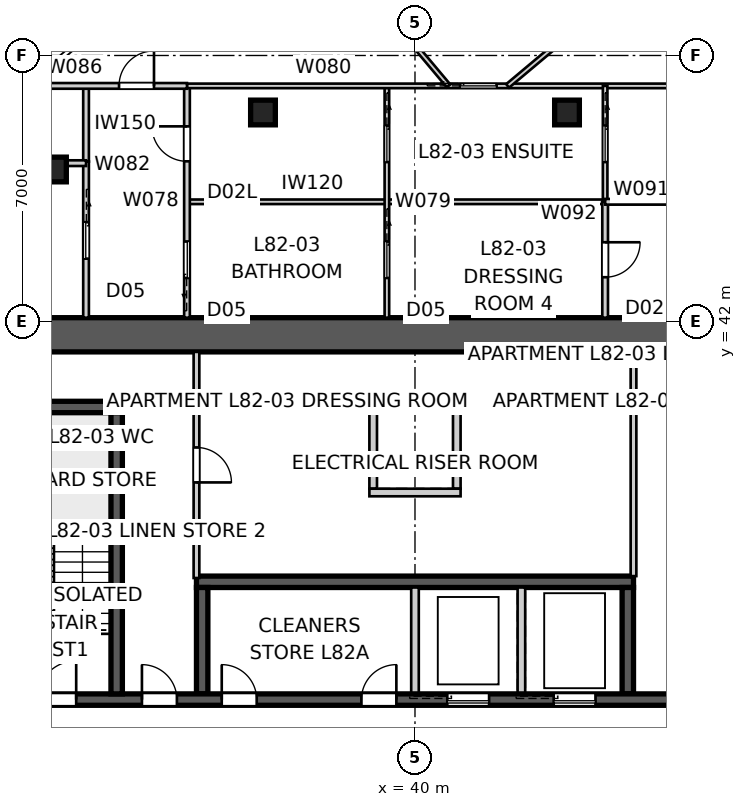
"""IFC4 building model, lengths in metres.
Left out: names, types, materials, properties, quantities, classifications, styles, units other than length and angle.
Written with IfcOpenShell. Run it as: python <this file> out.ifc"""

import sys

from ifc_helpers import new_model, si_unit, direction, frame, frame_2d, origin, origin_2d, place, context, subcontext, project, spatial, polyline, rectangle, outline, extrude, element, fill, save


model = new_model("IFC4")
c1 = context("Model", 3, precision=1e-05, world=origin(), true_north=direction((0.0, 1.0)))
c2 = subcontext(c1, "Body", "Model", "MODEL_VIEW")
j1 = project(units=[si_unit("LENGTHUNIT", "METRE"), si_unit("PLANEANGLEUNIT", "RADIAN")], contexts=[c1])
p1 = place(None, origin())
s1 = spatial("IfcSite", under=j1, at=p1, CompositionType="ELEMENT")
p2 = place(p1, origin())
s2 = spatial("IfcBuilding", under=s1, at=p2, CompositionType="ELEMENT")
p3 = place(p2, frame((0.0, 0.0, 296.4)))
s3 = spatial("IfcBuildingStorey", under=s2, at=p3, CompositionType="ELEMENT", Elevation=296.4)
p4 = place(p3, frame((28.8, 41.65, 0.0), z_axis=(0.0, 0.0, 1.0), x_axis=(1.0, 0.0, 0.0)))
e1 = element("IfcWall", 1, at=p4, inside=s3, PredefinedType="SHEAR", context=c2, shape_type="SweptSolid", body=[
    extrude(outline(polyline([(0.0, -0.45), (22.4, -0.45), (22.4, -0.025), (22.85, -0.025), (22.85, 0.025), (22.4, 0.025), (22.4, 0.45), (0.0, 0.45), (0.0, 0.025), (-0.45, 0.025), (-0.45, -0.025), (0.0, -0.025), (0.0, -0.45)])), origin(), (0.0, 0.0, 1.0), 3.4),
])
p5 = place(p3, frame((28.8, 32.05, 0.0), z_axis=(0.0, 0.0, 1.0), x_axis=(1.0, 0.0, 0.0)))
e2 = element("IfcWall", 2, at=p5, inside=s3, PredefinedType="SHEAR", context=c2, shape_type="SweptSolid", body=[
    extrude(rectangle(XDim=22.4, YDim=0.3, at=frame_2d((11.2, 0.0))), origin(), (0.0, 0.0, 1.0), 3.4),
])
p6 = place(p5, frame((19.04, 0.0, 0.0)))
e3 = element("IfcOpeningElement", 3, at=p6, cuts=e2, PredefinedType="OPENING", context=c2, shape_type="SweptSolid", body=[
    extrude(rectangle(XDim=0.92, YDim=2.1, at=frame_2d((0.46, 1.05))), frame((0.0, 0.16, 0.0), z_axis=(0.0, -1.0, 0.0), x_axis=(1.0, 0.0, 0.0)), (0.0, 0.0, 1.0), 0.32),
])
p7 = place(p5, frame((1.265, 0.0, 0.0)))
e4 = element("IfcOpeningElement", 4, at=p7, cuts=e2, PredefinedType="OPENING", context=c2, shape_type="SweptSolid", body=[
    extrude(rectangle(XDim=1.02, YDim=2.1, at=frame_2d((0.51, 1.05))), frame((0.0, 0.16, 0.0), z_axis=(0.0, -1.0, 0.0), x_axis=(1.0, 0.0, 0.0)), (0.0, 0.0, 1.0), 0.32),
])
p8 = place(p5, frame((4.015, 0.0, 0.0)))
e5 = element("IfcOpeningElement", 5, at=p8, cuts=e2, PredefinedType="OPENING", context=c2, shape_type="SweptSolid", body=[
    extrude(rectangle(XDim=0.92, YDim=2.1, at=frame_2d((0.46, 1.05))), frame((0.0, 0.16, 0.0), z_axis=(0.0, -1.0, 0.0), x_axis=(1.0, 0.0, 0.0)), (0.0, 0.0, 1.0), 0.32),
])
p9 = place(p5, frame((6.115, 0.0, 0.0)))
e6 = element("IfcOpeningElement", 6, at=p9, cuts=e2, PredefinedType="OPENING", context=c2, shape_type="SweptSolid", body=[
    extrude(rectangle(XDim=0.92, YDim=2.1, at=frame_2d((0.46, 1.05))), frame((0.0, 0.16, 0.0), z_axis=(0.0, -1.0, 0.0), x_axis=(1.0, 0.0, 0.0)), (0.0, 0.0, 1.0), 0.32),
])
p10 = place(p5, frame((9.79, 0.0, 0.0)))
e7 = element("IfcOpeningElement", 7, at=p10, cuts=e2, PredefinedType="OPENING", context=c2, shape_type="SweptSolid", body=[
    extrude(rectangle(XDim=0.92, YDim=2.1, at=frame_2d((0.46, 1.05))), frame((0.0, 0.16, 0.0), z_axis=(0.0, -1.0, 0.0), x_axis=(1.0, 0.0, 0.0)), (0.0, 0.0, 1.0), 0.32),
])
p11 = place(p5, frame((12.05, 0.0, 0.0)))
e8 = element("IfcOpeningElement", 8, at=p11, cuts=e2, PredefinedType="OPENING", context=c2, shape_type="SweptSolid", body=[
    extrude(rectangle(XDim=1.1, YDim=2.1, at=frame_2d((0.55, 1.05))), frame((0.0, 0.16, 0.0), z_axis=(0.0, -1.0, 0.0), x_axis=(1.0, 0.0, 0.0)), (0.0, 0.0, 1.0), 0.32),
])
p12 = place(p5, frame((14.85, 0.0, 0.0)))
e9 = element("IfcOpeningElement", 9, at=p12, cuts=e2, PredefinedType="OPENING", context=c2, shape_type="SweptSolid", body=[
    extrude(rectangle(XDim=1.1, YDim=2.1, at=frame_2d((0.55, 1.05))), frame((0.0, 0.16, 0.0), z_axis=(0.0, -1.0, 0.0), x_axis=(1.0, 0.0, 0.0)), (0.0, 0.0, 1.0), 0.32),
])
p13 = place(p3, frame((34.25, 35.15, 0.0), z_axis=(0.0, 0.0, 1.0), x_axis=(1.0, 0.0, 0.0)))
e10 = element("IfcWall", 10, at=p13, inside=s3, PredefinedType="SHEAR", context=c2, shape_type="SweptSolid", body=[
    extrude(rectangle(XDim=11.5, YDim=0.3, at=frame_2d((5.75, 0.0))), origin(), (0.0, 0.0, 1.0), 3.4),
])
p14 = place(p3, frame((34.4, 32.2, 0.0), z_axis=(0.0, 0.0, 1.0), x_axis=(0.0, 1.0, 0.0)))
e11 = element("IfcWall", 11, at=p14, inside=s3, PredefinedType="SHEAR", context=c2, shape_type="SweptSolid", body=[
    extrude(rectangle(XDim=2.8, YDim=0.3, at=frame_2d((1.4, 0.0))), origin(), (0.0, 0.0, 1.0), 3.4),
])
for number, where, z_axis, x_axis in (
    (12, (40.0, 32.2, 0.0), (0.0, 0.0, 1.0), (0.0, 1.0, 0.0)),
    (13, (42.8, 32.2, 0.0), (0.0, 0.0, 1.0), (0.0, 1.0, 0.0)),
):
    element("IfcWall", number, at=place(p3, frame(where, z_axis=z_axis, x_axis=x_axis)), inside=s3, PredefinedType="SOLIDWALL", context=c2, shape_type="SweptSolid", body=[
        extrude(rectangle(XDim=2.8, YDim=0.2, at=frame_2d((1.4, 0.0))), origin(), (0.0, 0.0, 1.0), 3.4),
    ])
p15 = place(p3, frame((45.6, 32.2, 0.0), z_axis=(0.0, 0.0, 1.0), x_axis=(0.0, 1.0, 0.0)))
e14 = element("IfcWall", 14, at=p15, inside=s3, PredefinedType="SHEAR", context=c2, shape_type="SweptSolid", body=[
    extrude(rectangle(XDim=2.8, YDim=0.3, at=frame_2d((1.4, 0.0))), origin(), (0.0, 0.0, 1.0), 3.4),
])
p16 = place(p3, frame((32.15, 32.2, 0.0), z_axis=(0.0, 0.0, 1.0), x_axis=(0.0, 1.0, 0.0)))
e15 = element("IfcWall", 15, at=p16, inside=s3, PredefinedType="SHEAR", context=c2, shape_type="SweptSolid", body=[
    extrude(rectangle(XDim=7.7, YDim=0.3, at=frame_2d((3.85, 0.0))), origin(), (0.0, 0.0, 1.0), 3.4),
])
p17 = place(p3, frame((28.8, 39.75, 0.0), z_axis=(0.0, 0.0, 1.0), x_axis=(1.0, 0.0, 0.0)))
e16 = element("IfcWall", 16, at=p17, inside=s3, PredefinedType="SHEAR", context=c2, shape_type="SweptSolid", body=[
    extrude(rectangle(XDim=3.5, YDim=0.3, at=frame_2d((1.75, 0.0))), origin(), (0.0, 0.0, 1.0), 3.4),
])
for number, where, z_axis, x_axis in (
    (17, (38.9, 37.6, 0.0), (0.0, 0.0, 1.0), (0.0, 1.0, 0.0)),
    (18, (41.1, 37.6, 0.0), (0.0, 0.0, 1.0), (0.0, 1.0, 0.0)),
):
    element("IfcWall", number, at=place(p3, frame(where, z_axis=z_axis, x_axis=x_axis)), inside=s3, PredefinedType="SOLIDWALL", context=c2, shape_type="SweptSolid", body=[
        extrude(rectangle(XDim=2.0, YDim=0.2, at=frame_2d((1.0, 0.0))), origin(), (0.0, 0.0, 1.0), 3.4),
    ])
for number, where, z_axis, x_axis in (
    (19, (38.8, 37.5, 0.0), (0.0, 0.0, 1.0), (1.0, 0.0, 0.0)),
    (20, (38.8, 39.7, 0.0), (0.0, 0.0, 1.0), (1.0, 0.0, 0.0)),
):
    element("IfcWall", number, at=place(p3, frame(where, z_axis=z_axis, x_axis=x_axis)), inside=s3, PredefinedType="SOLIDWALL", context=c2, shape_type="SweptSolid", body=[
        extrude(rectangle(XDim=2.4, YDim=0.2, at=frame_2d((1.2, 0.0))), origin(), (0.0, 0.0, 1.0), 3.4),
    ])
for number, where, z_axis, x_axis in (
    (21, (44.0, 47.5, 0.0), (0.0, 0.0, 1.0), (1.0, 0.0, 0.0)),
    (22, (36.0, 47.5, 0.0), (0.0, 0.0, 1.0), (1.0, 0.0, 0.0)),
    (23, (30.5, 46.0, 0.0), (0.0, 0.0, 1.0), (1.0, 0.0, 0.0)),
):
    element("IfcColumn", number, at=place(p3, frame(where, z_axis=z_axis, x_axis=x_axis)), inside=s3, PredefinedType="COLUMN", context=c2, shape_type="SweptSolid", body=[
        extrude(rectangle(XDim=0.65, YDim=0.65, at=origin_2d()), origin(), (0.0, 0.0, 1.0), 3.4),
    ])
p18 = place(p3, frame((34.25, 41.2, 0.0), z_axis=(0.0, 0.0, 1.0), x_axis=(0.0, -1.0, 0.0)))
e24 = element("IfcWall", 24, at=p18, inside=s3, PredefinedType="SOLIDWALL", context=c2, shape_type="SweptSolid", body=[
    extrude(rectangle(XDim=5.95, YDim=0.15, at=frame_2d((2.975, 0.0))), origin(), (0.0, 0.0, 1.0), 3.2),
])
p19 = place(p18, frame((2.515, 0.0, 0.0)))
e25 = element("IfcOpeningElement", 25, at=p19, cuts=e24, PredefinedType="OPENING", context=c2, shape_type="SweptSolid", body=[
    extrude(rectangle(XDim=0.92, YDim=2.1, at=frame_2d((0.46, 1.05))), frame((0.0, 0.085, 0.0), z_axis=(0.0, -1.0, 0.0), x_axis=(1.0, 0.0, 0.0)), (0.0, 0.0, 1.0), 0.17),
])
p20 = place(p3, frame((45.75, 41.2, 0.0), z_axis=(0.0, 0.0, 1.0), x_axis=(0.0, -1.0, 0.0)))
e26 = element("IfcWall", 26, at=p20, inside=s3, PredefinedType="SOLIDWALL", context=c2, shape_type="SweptSolid", body=[
    extrude(rectangle(XDim=5.9, YDim=0.15, at=frame_2d((2.95, 0.0))), origin(), (0.0, 0.0, 1.0), 3.2),
])
p21 = place(p3, frame((34.0, 45.15, 0.0), z_axis=(0.0, 0.0, 1.0), x_axis=(1.0, 0.0, 0.0)))
e27 = element("IfcWall", 27, at=p21, inside=s3, PredefinedType="PARTITIONING", context=c2, shape_type="SweptSolid", body=[
    extrude(rectangle(XDim=11.003, YDim=0.12, at=frame_2d((5.501, 0.0))), origin(), (0.0, 0.0, 1.0), 3.2),
])
p22 = place(p3, frame((34.0, 42.1, 0.0), z_axis=(0.0, 0.0, 1.0), x_axis=(0.0, 1.0, 0.0)))
e28 = element("IfcWall", 28, at=p22, inside=s3, PredefinedType="SOLIDWALL", context=c2, shape_type="SweptSolid", body=[
    extrude(rectangle(XDim=6.1, YDim=0.15, at=frame_2d((3.05, 0.0))), origin(), (0.0, 0.0, 1.0), 3.2),
])
p23 = place(p22, frame((4.115, 0.0, 0.0)))
e29 = element("IfcOpeningElement", 29, at=p23, cuts=e28, PredefinedType="OPENING", context=c2, shape_type="SweptSolid", body=[
    extrude(rectangle(XDim=0.92, YDim=2.1, at=frame_2d((0.46, 1.05))), frame((0.0, 0.085, 0.0), z_axis=(0.0, -1.0, 0.0), x_axis=(1.0, 0.0, 0.0)), (0.0, 0.0, 1.0), 0.17),
])
p24 = place(p22, frame((1.045, 0.0, 0.0)))
e30 = element("IfcOpeningElement", 30, at=p24, cuts=e28, PredefinedType="OPENING", context=c2, shape_type="SweptSolid", body=[
    extrude(rectangle(XDim=0.96, YDim=2.1, at=frame_2d((0.48, 1.05))), frame((0.0, 0.085, 0.0), z_axis=(0.0, -1.0, 0.0), x_axis=(1.0, 0.0, 0.0)), (0.0, 0.0, 1.0), 0.17),
])
p25 = place(p3, frame((39.26, 48.2, 0.0), z_axis=(0.0, 0.0, 1.0), x_axis=(0.0, -1.0, 0.0)))
e31 = element("IfcWall", 31, at=p25, inside=s3, PredefinedType="PARTITIONING", context=c2, shape_type="SweptSolid", body=[
    extrude(rectangle(XDim=6.1, YDim=0.12, at=frame_2d((3.05, 0.0))), origin(), (0.0, 0.0, 1.0), 3.2),
])
p26 = place(p25, frame((1.045, 0.0, 0.0)))
e32 = element("IfcOpeningElement", 32, at=p26, cuts=e31, PredefinedType="OPENING", context=c2, shape_type="SweptSolid", body=[
    extrude(rectangle(XDim=0.96, YDim=2.1, at=frame_2d((0.48, 1.05))), frame((0.0, 0.07, 0.0), z_axis=(0.0, -1.0, 0.0), x_axis=(1.0, 0.0, 0.0)), (0.0, 0.0, 1.0), 0.14),
])
p27 = place(p25, frame((4.095, 0.0, 0.0)))
e33 = element("IfcOpeningElement", 33, at=p27, cuts=e31, PredefinedType="OPENING", context=c2, shape_type="SweptSolid", body=[
    extrude(rectangle(XDim=0.96, YDim=2.1, at=frame_2d((0.48, 1.05))), frame((0.0, 0.07, 0.0), z_axis=(0.0, -1.0, 0.0), x_axis=(1.0, 0.0, 0.0)), (0.0, 0.0, 1.0), 0.14),
])
p28 = place(p3, frame((34.0, 48.2, 0.0), z_axis=(0.0, 0.0, 1.0), x_axis=(1.0, 0.0, 0.0)))
e34 = element("IfcWall", 34, at=p28, inside=s3, PredefinedType="PARTITIONING", context=c2, shape_type="SweptSolid", body=[
    extrude(rectangle(XDim=17.437, YDim=0.12, at=frame_2d((8.718, 0.0))), origin(), (0.0, 0.0, 1.0), 3.2),
])
p29 = place(p28, frame((7.186, 0.0, 0.0)))
e35 = element("IfcOpeningElement", 35, at=p29, cuts=e34, PredefinedType="OPENING", context=c2, shape_type="SweptSolid", body=[
    extrude(rectangle(XDim=0.96, YDim=2.1, at=frame_2d((0.48, 1.05))), frame((0.0, 0.07, 0.0), z_axis=(0.0, -1.0, 0.0), x_axis=(1.0, 0.0, 0.0)), (0.0, 0.0, 1.0), 0.14),
])
p30 = place(p28, frame((12.867, 0.0, 0.0)))
e36 = element("IfcOpeningElement", 36, at=p30, cuts=e34, PredefinedType="OPENING", context=c2, shape_type="SweptSolid", body=[
    extrude(rectangle(XDim=0.92, YDim=2.34, at=frame_2d((0.46, 1.17))), frame((0.0, 0.07, 0.0), z_axis=(0.0, -1.0, 0.0), x_axis=(1.0, 0.0, 0.0)), (0.0, 0.0, 1.0), 0.14),
])
p31 = place(p3, frame((31.344, 48.2, 0.0), z_axis=(0.0, 0.0, 1.0), x_axis=(0.0, -1.0, 0.0)))
e37 = element("IfcWall", 37, at=p31, inside=s3, PredefinedType="SOLIDWALL", context=c2, shape_type="SweptSolid", body=[
    extrude(rectangle(XDim=1.992, YDim=0.15, at=frame_2d((0.996, 0.0))), origin(), (0.0, 0.0, 1.0), 3.2),
])
p32 = place(p3, frame((31.344, 46.208, 0.0), z_axis=(0.0, 0.0, 1.0), x_axis=(0.0, -1.0, 0.0)))
e38 = element("IfcWall", 38, at=p32, inside=s3, PredefinedType="SOLIDWALL", context=c2, shape_type="SweptSolid", body=[
    extrude(rectangle(XDim=4.108, YDim=0.15, at=frame_2d((2.054, 0.0))), origin(), (0.0, 0.0, 1.0), 2.672),
])
p33 = place(p32, frame((1.595, 0.0, 0.0)))
e39 = element("IfcOpeningElement", 39, at=p33, cuts=e38, PredefinedType="OPENING", context=c2, shape_type="SweptSolid", body=[
    extrude(rectangle(XDim=0.96, YDim=2.1, at=frame_2d((0.48, 1.05))), frame((0.0, 0.085, 0.0), z_axis=(0.0, -1.0, 0.0), x_axis=(1.0, 0.0, 0.0)), (0.0, 0.0, 1.0), 0.17),
])
p34 = place(p3, frame((30.46, 46.167, 0.0), z_axis=(0.0, 0.0, 1.0), x_axis=(1.0, 0.0, 0.0)))
e40 = element("IfcWall", 40, at=p34, inside=s3, PredefinedType="SOLIDWALL", context=c2, shape_type="SweptSolid", body=[
    extrude(rectangle(XDim=0.884, YDim=0.15, at=frame_2d((0.442, 0.0))), origin(), (0.0, 0.0, 1.0), 2.2),
])
p35 = place(p3, frame((29.86, 48.2, 0.0), z_axis=(0.0, 0.0, 1.0), x_axis=(1.0, 0.0, 0.0)))
e41 = element("IfcWall", 41, at=p35, inside=s3, PredefinedType="SOLIDWALL", context=c2, shape_type="SweptSolid", body=[
    extrude(rectangle(XDim=4.141, YDim=0.15, at=frame_2d((2.07, 0.0))), origin(), (0.0, 0.0, 1.0), 3.2),
])
p36 = place(p35, frame((2.353, 0.0, 0.0)))
e42 = element("IfcOpeningElement", 42, at=p36, cuts=e41, PredefinedType="OPENING", context=c2, shape_type="SweptSolid", body=[
    extrude(rectangle(XDim=0.92, YDim=2.34, at=frame_2d((0.46, 1.17))), frame((0.0, 0.085, 0.0), z_axis=(0.0, -1.0, 0.0), x_axis=(1.0, 0.0, 0.0)), (0.0, 0.0, 1.0), 0.17),
])
p37 = place(p3, frame((45.003, 48.2, 0.0), z_axis=(0.0, 0.0, 1.0), x_axis=(0.0, -1.0, 0.0)))
e43 = element("IfcWall", 43, at=p37, inside=s3, PredefinedType="PARTITIONING", context=c2, shape_type="SweptSolid", body=[
    extrude(rectangle(XDim=3.05, YDim=0.12, at=frame_2d((1.525, 0.0))), origin(), (0.0, 0.0, 1.0), 3.2),
])
p38 = place(p37, frame((1.045, 0.0, 0.0)))
e44 = element("IfcOpeningElement", 44, at=p38, cuts=e43, PredefinedType="OPENING", context=c2, shape_type="SweptSolid", body=[
    extrude(rectangle(XDim=0.96, YDim=2.1, at=frame_2d((0.48, 1.05))), frame((0.0, 0.07, 0.0), z_axis=(0.0, -1.0, 0.0), x_axis=(1.0, 0.0, 0.0)), (0.0, 0.0, 1.0), 0.14),
])
p39 = place(p3, frame((45.003, 45.15, 0.0), z_axis=(0.0, 0.0, 1.0), x_axis=(0.0, -1.0, 0.0)))
e45 = element("IfcWall", 45, at=p39, inside=s3, PredefinedType="SOLIDWALL", context=c2, shape_type="SweptSolid", body=[
    extrude(rectangle(XDim=3.05, YDim=0.15, at=frame_2d((1.525, 0.0))), origin(), (0.0, 0.0, 1.0), 3.2),
])
p40 = place(p39, frame((1.065, 0.0, 0.0)))
e46 = element("IfcOpeningElement", 46, at=p40, cuts=e45, PredefinedType="OPENING", context=c2, shape_type="SweptSolid", body=[
    extrude(rectangle(XDim=0.92, YDim=2.34, at=frame_2d((0.46, 1.17))), frame((0.0, 0.085, 0.0), z_axis=(0.0, -1.0, 0.0), x_axis=(1.0, 0.0, 0.0)), (0.0, 0.0, 1.0), 0.17),
])
p41 = place(p3, frame((45.003, 45.15, 0.0), z_axis=(0.0, 0.0, 1.0), x_axis=(1.0, 0.0, 0.0)))
e47 = element("IfcWall", 47, at=p41, inside=s3, PredefinedType="SOLIDWALL", context=c2, shape_type="SweptSolid", body=[
    extrude(rectangle(XDim=4.649, YDim=0.15, at=frame_2d((2.324, 0.0))), origin(), (0.0, 0.0, 1.0), 3.2),
])
p42 = place(p3, frame((40.883, 48.2, 0.0), z_axis=(0.0, 0.0, 1.0), x_axis=(-0.642790379821, 0.766042118691, 0.0)))
e48 = element("IfcWall", 48, at=p42, inside=s3, PredefinedType="PARTITIONING", context=c2, shape_type="SweptSolid", body=[
    extrude(rectangle(XDim=7.085, YDim=0.12, at=frame_2d((3.543, 0.0))), origin(), (0.0, 0.0, 1.0), 3.2),
])
p43 = place(p42, frame((4.64, 0.0, 0.0)))
e49 = element("IfcOpeningElement", 49, at=p43, cuts=e48, PredefinedType="OPENING", context=c2, shape_type="SweptSolid", body=[
    extrude(rectangle(XDim=0.92, YDim=2.34, at=frame_2d((0.46, 1.17))), frame((0.0, 0.07, 0.0), z_axis=(0.0, -1.0, 0.0), x_axis=(1.0, 0.0, 0.0)), (0.0, 0.0, 1.0), 0.14),
])
p44 = place(p3, frame((47.719, 52.631, 0.0), z_axis=(0.0, 0.0, 1.0), x_axis=(-0.766036842262, -0.642796667926, 0.0)))
e50 = element("IfcWall", 50, at=p44, inside=s3, PredefinedType="PARTITIONING", context=c2, shape_type="SweptSolid", body=[
    extrude(rectangle(XDim=6.894, YDim=0.12, at=frame_2d((3.447, 0.0))), origin(), (0.0, 0.0, 1.0), 3.2),
])
p45 = place(p7, origin())
e51 = element("IfcDoor", 51, at=p45, inside=s3, OperationType="SINGLE_SWING_RIGHT", PredefinedType="DOOR", context=c2, shape_type="SweptSolid", body=[
    extrude(rectangle(XDim=1.02, YDim=2.1, at=frame_2d((0.51, 1.05))), frame((0.0, 0.025, 0.0), z_axis=(0.0, -1.0, 0.0), x_axis=(1.0, 0.0, 0.0)), (0.0, 0.0, 1.0), 0.05),
])
fill(e4, e51)
p46 = place(p8, origin())
e52 = element("IfcDoor", 52, at=p46, inside=s3, OperationType="SINGLE_SWING_LEFT", PredefinedType="DOOR", context=c2, shape_type="SweptSolid", body=[
    extrude(rectangle(XDim=0.92, YDim=2.1, at=frame_2d((0.46, 1.05))), frame((0.0, 0.025, 0.0), z_axis=(0.0, -1.0, 0.0), x_axis=(1.0, 0.0, 0.0)), (0.0, 0.0, 1.0), 0.05),
])
fill(e5, e52)
p47 = place(p19, origin())
e53 = element("IfcDoor", 53, at=p47, inside=s3, OperationType="SINGLE_SWING_RIGHT", PredefinedType="DOOR", context=c2, shape_type="SweptSolid", body=[
    extrude(rectangle(XDim=0.92, YDim=2.1, at=frame_2d((0.46, 1.05))), frame((0.0, 0.025, 0.0), z_axis=(0.0, -1.0, 0.0), x_axis=(1.0, 0.0, 0.0)), (0.0, 0.0, 1.0), 0.05),
])
fill(e25, e53)
p48 = place(p33, origin())
e54 = element("IfcDoor", 54, at=p48, inside=s3, OperationType="SLIDING_TO_LEFT", PredefinedType="DOOR", context=c2, shape_type="SweptSolid", body=[
    extrude(rectangle(XDim=0.96, YDim=2.1, at=frame_2d((0.48, 1.05))), frame((0.0, 0.025, 0.0), z_axis=(0.0, -1.0, 0.0), x_axis=(1.0, 0.0, 0.0)), (0.0, 0.0, 1.0), 0.05),
])
fill(e39, e54)
p49 = place(p23, origin())
e55 = element("IfcDoor", 55, at=p49, inside=s3, OperationType="SINGLE_SWING_RIGHT", PredefinedType="DOOR", context=c2, shape_type="SweptSolid", body=[
    extrude(rectangle(XDim=0.92, YDim=2.1, at=frame_2d((0.46, 1.05))), frame((0.0, 0.025, 0.0), z_axis=(0.0, -1.0, 0.0), x_axis=(1.0, 0.0, 0.0)), (0.0, 0.0, 1.0), 0.05),
])
fill(e29, e55)
p50 = place(p24, origin())
e56 = element("IfcDoor", 56, at=p50, inside=s3, OperationType="SLIDING_TO_LEFT", PredefinedType="DOOR", context=c2, shape_type="SweptSolid", body=[
    extrude(rectangle(XDim=0.96, YDim=2.1, at=frame_2d((0.48, 1.05))), frame((0.0, 0.025, 0.0), z_axis=(0.0, -1.0, 0.0), x_axis=(1.0, 0.0, 0.0)), (0.0, 0.0, 1.0), 0.05),
])
fill(e30, e56)
p51 = place(p36, origin())
e57 = element("IfcDoor", 57, at=p51, inside=s3, OperationType="SINGLE_SWING_RIGHT", PredefinedType="DOOR", context=c2, shape_type="SweptSolid", body=[
    extrude(rectangle(XDim=0.92, YDim=2.34, at=frame_2d((0.46, 1.17))), frame((0.0, 0.025, 0.0), z_axis=(0.0, -1.0, 0.0), x_axis=(1.0, 0.0, 0.0)), (0.0, 0.0, 1.0), 0.05),
])
fill(e42, e57)
p52 = place(p26, origin())
e58 = element("IfcDoor", 58, at=p52, inside=s3, OperationType="SLIDING_TO_LEFT", PredefinedType="DOOR", context=c2, shape_type="SweptSolid", body=[
    extrude(rectangle(XDim=0.96, YDim=2.1, at=frame_2d((0.48, 1.05))), frame((0.0, 0.025, 0.0), z_axis=(0.0, -1.0, 0.0), x_axis=(1.0, 0.0, 0.0)), (0.0, 0.0, 1.0), 0.05),
])
fill(e32, e58)
p53 = place(p27, origin())
e59 = element("IfcDoor", 59, at=p53, inside=s3, OperationType="SLIDING_TO_LEFT", PredefinedType="DOOR", context=c2, shape_type="SweptSolid", body=[
    extrude(rectangle(XDim=0.96, YDim=2.1, at=frame_2d((0.48, 1.05))), frame((0.0, 0.025, 0.0), z_axis=(0.0, -1.0, 0.0), x_axis=(1.0, 0.0, 0.0)), (0.0, 0.0, 1.0), 0.05),
])
fill(e33, e59)
p54 = place(p38, origin())
e60 = element("IfcDoor", 60, at=p54, inside=s3, OperationType="SLIDING_TO_LEFT", PredefinedType="DOOR", context=c2, shape_type="SweptSolid", body=[
    extrude(rectangle(XDim=0.96, YDim=2.1, at=frame_2d((0.48, 1.05))), frame((0.0, 0.025, 0.0), z_axis=(0.0, -1.0, 0.0), x_axis=(1.0, 0.0, 0.0)), (0.0, 0.0, 1.0), 0.05),
])
fill(e44, e60)
p55 = place(p29, origin())
e61 = element("IfcDoor", 61, at=p55, inside=s3, OperationType="SLIDING_TO_LEFT", PredefinedType="DOOR", context=c2, shape_type="SweptSolid", body=[
    extrude(rectangle(XDim=0.96, YDim=2.1, at=frame_2d((0.48, 1.05))), frame((0.0, 0.025, 0.0), z_axis=(0.0, -1.0, 0.0), x_axis=(1.0, 0.0, 0.0)), (0.0, 0.0, 1.0), 0.05),
])
fill(e35, e61)
p56 = place(p40, origin())
e62 = element("IfcDoor", 62, at=p56, inside=s3, OperationType="SINGLE_SWING_LEFT", PredefinedType="DOOR", context=c2, shape_type="SweptSolid", body=[
    extrude(rectangle(XDim=0.92, YDim=2.34, at=frame_2d((0.46, 1.17))), frame((0.0, 0.025, 0.0), z_axis=(0.0, -1.0, 0.0), x_axis=(1.0, 0.0, 0.0)), (0.0, 0.0, 1.0), 0.05),
])
fill(e46, e62)
p57 = place(p9, origin())
e63 = element("IfcDoor", 63, at=p57, inside=s3, OperationType="SINGLE_SWING_LEFT", PredefinedType="DOOR", context=c2, shape_type="SweptSolid", body=[
    extrude(rectangle(XDim=0.92, YDim=2.1, at=frame_2d((0.46, 1.05))), frame((0.0, 0.025, 0.0), z_axis=(0.0, -1.0, 0.0), x_axis=(1.0, 0.0, 0.0)), (0.0, 0.0, 1.0), 0.05),
])
fill(e6, e63)
p58 = place(p10, origin())
e64 = element("IfcDoor", 64, at=p58, inside=s3, OperationType="SINGLE_SWING_RIGHT", PredefinedType="DOOR", context=c2, shape_type="SweptSolid", body=[
    extrude(rectangle(XDim=0.92, YDim=2.1, at=frame_2d((0.46, 1.05))), frame((0.0, 0.025, 0.0), z_axis=(0.0, -1.0, 0.0), x_axis=(1.0, 0.0, 0.0)), (0.0, 0.0, 1.0), 0.05),
])
fill(e7, e64)
p59 = place(p11, origin())
e65 = element("IfcDoor", 65, at=p59, inside=s3, OperationType="SLIDING_TO_LEFT", PredefinedType="DOOR", context=c2, shape_type="SweptSolid", body=[
    extrude(rectangle(XDim=1.1, YDim=2.1, at=frame_2d((0.55, 1.05))), frame((0.0, 0.025, 0.0), z_axis=(0.0, -1.0, 0.0), x_axis=(1.0, 0.0, 0.0)), (0.0, 0.0, 1.0), 0.05),
])
fill(e8, e65)
p60 = place(p12, origin())
e66 = element("IfcDoor", 66, at=p60, inside=s3, OperationType="SLIDING_TO_LEFT", PredefinedType="DOOR", context=c2, shape_type="SweptSolid", body=[
    extrude(rectangle(XDim=1.1, YDim=2.1, at=frame_2d((0.55, 1.05))), frame((0.0, 0.025, 0.0), z_axis=(0.0, -1.0, 0.0), x_axis=(1.0, 0.0, 0.0)), (0.0, 0.0, 1.0), 0.05),
])
fill(e9, e66)
save(model, sys.argv[1])
